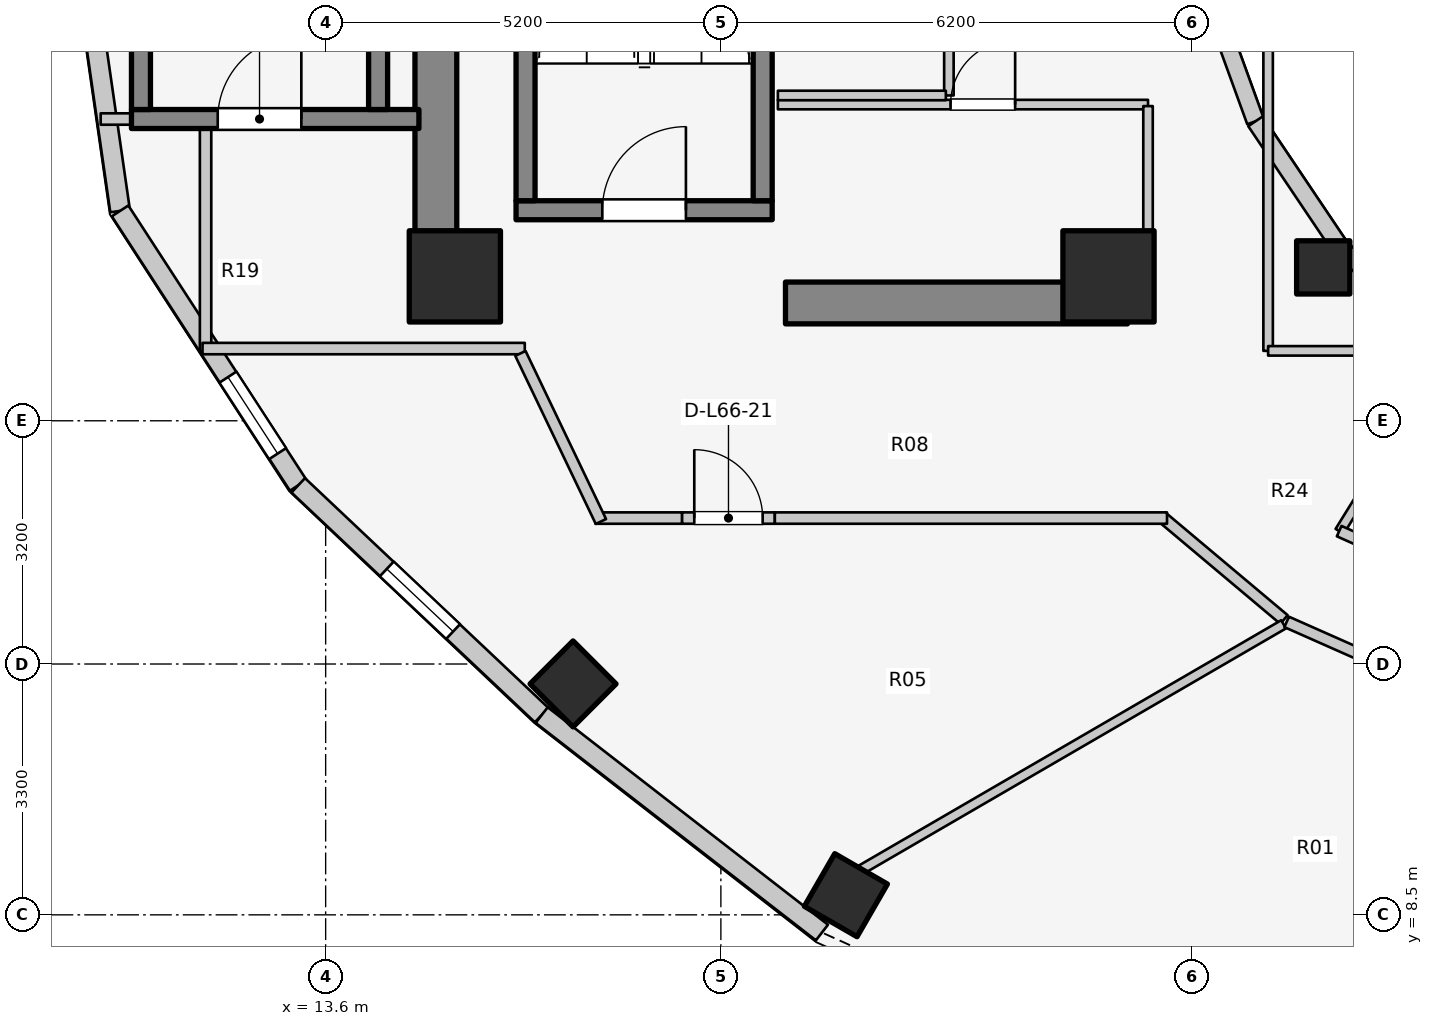
"""IFC4 building model, lengths in metres.
Left out: names, types, materials, properties, quantities, classifications, styles, units other than length and angle.
Written with IfcOpenShell. Run it as: python <this file> out.ifc"""

import sys

from ifc_helpers import new_model, si_unit, direction, frame, frame_2d, origin, origin_2d, place, context, subcontext, project, spatial, rectangle, extrude, element, fill, save


model = new_model("IFC4")
c1 = context("Model", 3, precision=1e-05, world=origin(), true_north=direction((0.0, 1.0)))
c2 = subcontext(c1, "Body", "Model", "MODEL_VIEW")
j1 = project(units=[si_unit("LENGTHUNIT", "METRE"), si_unit("PLANEANGLEUNIT", "RADIAN")], contexts=[c1])
p1 = place(None, origin())
s1 = spatial("IfcSite", under=j1, at=p1, CompositionType="ELEMENT")
p2 = place(p1, origin())
s2 = spatial("IfcBuilding", under=s1, at=p2, CompositionType="ELEMENT")
p3 = place(p2, frame((0.0, 0.0, 217.1)))
s3 = spatial("IfcBuildingStorey", under=s2, at=p3, CompositionType="ELEMENT", Elevation=217.1)
p4 = place(p3, frame((15.05, 17.05, 0.0), z_axis=(0.0, 0.0, 1.0), x_axis=(0.0, 1.0, 0.0)))
e1 = element("IfcWall", 1, at=p4, inside=s3, PredefinedType="SHEAR", context=c2, shape_type="SweptSolid", body=[
    extrude(rectangle(XDim=12.8, YDim=0.55, at=frame_2d((6.4, 0.0))), origin(), (0.0, 0.0, 1.0), 3.1),
])
p5 = place(p3, frame((19.65, 16.55, 0.0), z_axis=(0.0, 0.0, 1.0), x_axis=(1.0, 0.0, 0.0)))
e2 = element("IfcWall", 2, at=p5, inside=s3, PredefinedType="SHEAR", context=c2, shape_type="SweptSolid", body=[
    extrude(rectangle(XDim=4.5, YDim=0.55, at=frame_2d((2.25, 0.0))), origin(), (0.0, 0.0, 1.0), 3.1),
])
p6 = place(p3, frame((16.105, 17.77, 0.0), z_axis=(0.0, 0.0, 1.0), x_axis=(1.0, 0.0, 0.0)))
e3 = element("IfcWall", 3, at=p6, inside=s3, PredefinedType="SOLIDWALL", context=c2, shape_type="SweptSolid", body=[
    extrude(rectangle(XDim=3.37, YDim=0.25, at=frame_2d((1.685, 0.0))), origin(), (0.0, 0.0, 1.0), 3.1),
])
p7 = place(p6, frame((1.135, 0.0, 0.0)))
e4 = element("IfcOpeningElement", 4, at=p7, cuts=e3, PredefinedType="OPENING", context=c2, shape_type="SweptSolid", body=[
    extrude(rectangle(XDim=1.1, YDim=2.1, at=frame_2d((0.55, 1.05))), frame((0.0, 0.135, 0.0), z_axis=(0.0, -1.0, 0.0), x_axis=(1.0, 0.0, 0.0)), (0.0, 0.0, 1.0), 0.27),
])
for number, where, z_axis, x_axis in (
    (5, (16.23, 17.895, 0.0), (0.0, 0.0, 1.0), (0.0, 1.0, 0.0)),
    (6, (19.35, 17.895, 0.0), (0.0, 0.0, 1.0), (0.0, 1.0, 0.0)),
):
    element("IfcWall", number, at=place(p3, frame(where, z_axis=z_axis, x_axis=x_axis)), inside=s3, PredefinedType="SOLIDWALL", context=c2, shape_type="SweptSolid", body=[
        extrude(rectangle(XDim=7.81, YDim=0.25, at=frame_2d((3.905, 0.0))), origin(), (0.0, 0.0, 1.0), 3.1),
    ])
p8 = place(p3, frame((11.045, 18.97, 0.0), z_axis=(0.0, 0.0, 1.0), x_axis=(1.0, 0.0, 0.0)))
e7 = element("IfcWall", 7, at=p8, inside=s3, PredefinedType="SOLIDWALL", context=c2, shape_type="SweptSolid", body=[
    extrude(rectangle(XDim=3.782, YDim=0.25, at=frame_2d((1.891, 0.0))), origin(), (0.0, 0.0, 1.0), 3.1),
])
p9 = place(p8, frame((1.135, 0.0, 0.0)))
e8 = element("IfcOpeningElement", 8, at=p9, cuts=e7, PredefinedType="OPENING", context=c2, shape_type="SweptSolid", body=[
    extrude(rectangle(XDim=1.1, YDim=2.1, at=frame_2d((0.55, 1.05))), frame((0.0, 0.135, 0.0), z_axis=(0.0, -1.0, 0.0), x_axis=(1.0, 0.0, 0.0)), (0.0, 0.0, 1.0), 0.27),
])
for number, where, z_axis, x_axis in (
    (9, (11.17, 19.095, 0.0), (0.0, 0.0, 1.0), (0.0, 1.0, 0.0)),
    (10, (14.29, 19.095, 0.0), (0.0, 0.0, 1.0), (0.0, 1.0, 0.0)),
):
    element("IfcWall", number, at=place(p3, frame(where, z_axis=z_axis, x_axis=x_axis)), inside=s3, PredefinedType="SOLIDWALL", context=c2, shape_type="SweptSolid", body=[
        extrude(rectangle(XDim=7.81, YDim=0.25, at=frame_2d((3.905, 0.0))), origin(), (0.0, 0.0, 1.0), 3.1),
    ])
for number, where, z_axis, x_axis in (
    (11, (15.3, 16.9, 0.0), (0.0, 0.0, 1.0), (1.0, 0.0, 0.0)),
    (12, (23.9, 16.9, 0.0), (0.0, 0.0, 1.0), (1.0, 0.0, 0.0)),
):
    element("IfcColumn", number, at=place(p3, frame(where, z_axis=z_axis, x_axis=x_axis)), inside=s3, PredefinedType="COLUMN", context=c2, shape_type="SweptSolid", body=[
        extrude(rectangle(XDim=1.2, YDim=1.2, at=origin_2d()), origin(), (0.0, 0.0, 1.0), 3.1),
    ])
p10 = place(p3, frame((26.725, 17.018, 0.0), z_axis=(0.0, 0.0, 1.0), x_axis=(1.0, 0.0, 0.0)))
e13 = element("IfcColumn", 13, at=p10, inside=s3, PredefinedType="COLUMN", context=c2, shape_type="SweptSolid", body=[
    extrude(rectangle(XDim=0.7, YDim=0.7, at=origin_2d()), origin(), (0.0, 0.0, 1.0), 3.1),
])
for number, where, z_axis, x_axis in (
    (14, (16.855, 11.538, 0.0), (0.0, 0.0, 1.0), (-0.707, -0.707, 0.0)),
    (15, (20.445, 8.759, 0.0), (0.0, 0.0, 1.0), (-0.5, -0.866, 0.0)),
):
    element("IfcColumn", number, at=place(p3, frame(where, z_axis=z_axis, x_axis=x_axis)), inside=s3, PredefinedType="COLUMN", context=c2, shape_type="SweptSolid", body=[
        extrude(rectangle(XDim=0.8, YDim=0.8, at=origin_2d()), origin(), (0.0, 0.0, 1.0), 3.1),
    ])
p11 = place(p3, frame((25.123, 20.898, 0.0), z_axis=(0.0, 0.0, 1.0), x_axis=(0.341423187295, -0.93990968033, 0.0)))
e16 = element("IfcWall", 16, at=p11, inside=s3, PredefinedType="STANDARD", context=c2, shape_type="SweptSolid", body=[
    extrude(rectangle(XDim=2.084, YDim=0.23, at=frame_2d((1.042, 0.0))), origin(), (0.0, 0.0, 1.0), 2.56),
])
p12 = place(p3, frame((25.834, 18.94, 0.0), z_axis=(0.0, 0.0, 1.0), x_axis=(0.558197800898, -0.829707909492, 0.0)))
e17 = element("IfcWall", 17, at=p12, inside=s3, PredefinedType="STANDARD", context=c2, shape_type="SweptSolid", body=[
    extrude(rectangle(XDim=2.027, YDim=0.23, at=frame_2d((1.013, 0.0))), origin(), (0.0, 0.0, 1.0), 1.22),
])
p13 = place(p3, frame((26.965, 17.258, 0.0), z_axis=(0.0, 0.0, 1.0), x_axis=(0.752576694707, -0.658504607869, 0.0)))
e18 = element("IfcWall", 18, at=p13, inside=s3, PredefinedType="STANDARD", context=c2, shape_type="SweptSolid", body=[
    extrude(rectangle(XDim=1.959, YDim=0.23, at=frame_2d((0.98, 0.0))), origin(), (0.0, 0.0, 1.0), 1.22),
])
p14 = place(p3, frame((10.14, 23.0, 0.0), z_axis=(0.0, 0.0, 1.0), x_axis=(0.142712754019, -0.989764148593, 0.0)))
e19 = element("IfcWall", 19, at=p14, inside=s3, PredefinedType="STANDARD", context=c2, shape_type="SweptSolid", body=[
    extrude(rectangle(XDim=5.293, YDim=0.26, at=frame_2d((2.646, 0.0))), origin(), (0.0, 0.0, 1.0), 2.57),
])
p15 = place(p14, frame((1.458, 0.0, 0.75)))
e20 = element("IfcOpeningElement", 20, at=p15, cuts=e19, PredefinedType="OPENING", context=c2, shape_type="SweptSolid", body=[
    extrude(rectangle(XDim=1.2, YDim=1.5, at=frame_2d((0.6, 0.75))), frame((0.0, 0.14, 0.0), z_axis=(0.0, -1.0, 0.0), x_axis=(1.0, 0.0, 0.0)), (0.0, 0.0, 1.0), 0.28),
])
p16 = place(p3, frame((10.895, 17.761, 0.0), z_axis=(0.0, 0.0, 1.0), x_axis=(0.544475908819, -0.838776480784, 0.0)))
e21 = element("IfcWall", 21, at=p16, inside=s3, PredefinedType="STANDARD", context=c2, shape_type="SweptSolid", body=[
    extrude(rectangle(XDim=4.305, YDim=0.26, at=frame_2d((2.152, 0.0))), origin(), (0.0, 0.0, 1.0), 1.22),
])
p17 = place(p16, frame((2.607, 0.0, 0.15)))
e22 = element("IfcOpeningElement", 22, at=p17, cuts=e21, PredefinedType="OPENING", context=c2, shape_type="SweptSolid", body=[
    extrude(rectangle(XDim=1.2, YDim=0.9, at=frame_2d((0.6, 0.45))), frame((0.0, 0.14, 0.0), z_axis=(0.0, -1.0, 0.0), x_axis=(1.0, 0.0, 0.0)), (0.0, 0.0, 1.0), 0.28),
])
p18 = place(p3, frame((13.239, 14.151, 0.0), z_axis=(0.0, 0.0, 1.0), x_axis=(0.72731899451, -0.686299555752, 0.0)))
e23 = element("IfcWall", 23, at=p18, inside=s3, PredefinedType="STANDARD", context=c2, shape_type="SweptSolid", body=[
    extrude(rectangle(XDim=4.404, YDim=0.26, at=frame_2d((2.202, 0.0))), origin(), (0.0, 0.0, 1.0), 1.22),
])
p19 = place(p18, frame((1.602, 0.0, 0.15)))
e24 = element("IfcOpeningElement", 24, at=p19, cuts=e23, PredefinedType="OPENING", context=c2, shape_type="SweptSolid", body=[
    extrude(rectangle(XDim=1.2, YDim=0.9, at=frame_2d((0.6, 0.45))), frame((0.0, 0.14, 0.0), z_axis=(0.0, -1.0, 0.0), x_axis=(1.0, 0.0, 0.0)), (0.0, 0.0, 1.0), 0.28),
])
p20 = place(p3, frame((16.442, 11.128, 0.0), z_axis=(0.0, 0.0, 1.0), x_axis=(0.790126214723, -0.612944177563, 0.0)))
e25 = element("IfcWall", 25, at=p20, inside=s3, PredefinedType="STANDARD", context=c2, shape_type="SweptSolid", body=[
    extrude(rectangle(XDim=4.667, YDim=0.26, at=frame_2d((2.333, 0.0))), origin(), (0.0, 0.0, 1.0), 1.22),
])
p21 = place(p3, frame((19.55, 19.16, 0.0), z_axis=(0.0, 0.0, 1.0), x_axis=(1.0, 0.0, 0.0)))
e26 = element("IfcWall", 26, at=p21, inside=s3, PredefinedType="PARTITIONING", context=c2, shape_type="SweptSolid", body=[
    extrude(rectangle(XDim=4.87, YDim=0.125, at=frame_2d((2.435, 0.0))), origin(), (0.0, 0.0, 1.0), 2.12),
])
p22 = place(p21, frame((2.272, 0.0, 0.0)))
e27 = element("IfcOpeningElement", 27, at=p22, cuts=e26, PredefinedType="OPENING", context=c2, shape_type="SweptSolid", body=[
    extrude(rectangle(XDim=0.85, YDim=2.05, at=frame_2d((0.425, 1.025))), frame((0.0, 0.073, 0.0), z_axis=(0.0, -1.0, 0.0), x_axis=(1.0, 0.0, 0.0)), (0.0, 0.0, 1.0), 0.145),
])
p23 = place(p3, frame((24.42, 17.1, 0.0), z_axis=(0.0, 0.0, 1.0), x_axis=(0.0, 1.0, 0.0)))
e28 = element("IfcWall", 28, at=p23, inside=s3, PredefinedType="PARTITIONING", context=c2, shape_type="SweptSolid", body=[
    extrude(rectangle(XDim=2.04, YDim=0.125, at=frame_2d((1.02, 0.0))), origin(), (0.0, 0.0, 1.0), 1.952),
])
p24 = place(p3, frame((21.8, 19.28, 0.0), z_axis=(0.0, 0.0, 1.0), x_axis=(0.0, 1.0, 0.0)))
e29 = element("IfcWall", 29, at=p24, inside=s3, PredefinedType="PARTITIONING", context=c2, shape_type="SweptSolid", body=[
    extrude(rectangle(XDim=2.4, YDim=0.125, at=frame_2d((1.2, 0.0))), origin(), (0.0, 0.0, 1.0), 2.575),
])
p25 = place(p24, frame((0.7, 0.0, 0.0)))
e30 = element("IfcOpeningElement", 30, at=p25, cuts=e29, PredefinedType="OPENING", context=c2, shape_type="SweptSolid", body=[
    extrude(rectangle(XDim=0.85, YDim=2.05, at=frame_2d((0.425, 1.025))), frame((0.0, 0.073, 0.0), z_axis=(0.0, -1.0, 0.0), x_axis=(1.0, 0.0, 0.0)), (0.0, 0.0, 1.0), 0.145),
])
p26 = place(p3, frame((19.55, 19.28, 0.0), z_axis=(0.0, 0.0, 1.0), x_axis=(1.0, 0.0, 0.0)))
e31 = element("IfcWall", 31, at=p26, inside=s3, PredefinedType="PARTITIONING", context=c2, shape_type="SweptSolid", body=[
    extrude(rectangle(XDim=2.21, YDim=0.125, at=frame_2d((1.105, 0.0))), origin(), (0.0, 0.0, 1.0), 2.12),
])
p27 = place(p3, frame((28.45, 15.985, 0.0), z_axis=(0.0, 0.0, 1.0), x_axis=(-0.52592395012, -0.850531597702, 0.0)))
e32 = element("IfcWall", 32, at=p27, inside=s3, PredefinedType="PARTITIONING", context=c2, shape_type="SweptSolid", body=[
    extrude(rectangle(XDim=2.869, YDim=0.125, at=frame_2d((1.435, 0.0))), origin(), (0.0, 0.0, 1.0), 1.22),
])
p28 = place(p3, frame((26.935, 13.549, 0.0), z_axis=(0.0, 0.0, 1.0), x_axis=(0.912859324183, -0.408274239027, 0.0)))
e33 = element("IfcWall", 33, at=p28, inside=s3, PredefinedType="PARTITIONING", context=c2, shape_type="SweptSolid", body=[
    extrude(rectangle(XDim=2.682, YDim=0.15, at=frame_2d((1.341, 0.0))), origin(), (0.0, 0.0, 1.0), 1.22),
])
p29 = place(p3, frame((26.0, 15.92, 0.0), z_axis=(0.0, 0.0, 1.0), x_axis=(0.0, 1.0, 0.0)))
e34 = element("IfcWall", 34, at=p29, inside=s3, PredefinedType="PARTITIONING", context=c2, shape_type="SweptSolid", body=[
    extrude(rectangle(XDim=4.28, YDim=0.125, at=frame_2d((2.14, 0.0))), origin(), (0.0, 0.0, 1.0), 1.22),
])
p30 = place(p3, frame((26.0, 15.92, 0.0), z_axis=(0.0, 0.0, 1.0), x_axis=(1.0, 0.0, 0.0)))
e35 = element("IfcWall", 35, at=p30, inside=s3, PredefinedType="PARTITIONING", context=c2, shape_type="SweptSolid", body=[
    extrude(rectangle(XDim=2.6, YDim=0.125, at=frame_2d((1.3, 0.0))), origin(), (0.0, 0.0, 1.0), 1.22),
])
p31 = place(p3, frame((10.64, 18.97, 0.0), z_axis=(0.0, 0.0, 1.0), x_axis=(1.0, 0.0, 0.0)))
e36 = element("IfcWall", 36, at=p31, inside=s3, PredefinedType="PARTITIONING", context=c2, shape_type="SweptSolid", body=[
    extrude(rectangle(XDim=0.4, YDim=0.15, at=frame_2d((0.2, 0.0))), origin(), (0.0, 0.0, 1.0), 2.575),
])
p32 = place(p3, frame((12.02, 15.91, 0.0), z_axis=(0.0, 0.0, 1.0), x_axis=(0.0, 1.0, 0.0)))
e37 = element("IfcWall", 37, at=p32, inside=s3, PredefinedType="PARTITIONING", context=c2, shape_type="SweptSolid", body=[
    extrude(rectangle(XDim=2.93, YDim=0.15, at=frame_2d((1.465, 0.0))), origin(), (0.0, 0.0, 1.0), 2.575),
])
p33 = place(p3, frame((11.98, 15.95, 0.0), z_axis=(0.0, 0.0, 1.0), x_axis=(1.0, 0.0, 0.0)))
e38 = element("IfcWall", 38, at=p33, inside=s3, PredefinedType="PARTITIONING", context=c2, shape_type="SweptSolid", body=[
    extrude(rectangle(XDim=4.24, YDim=0.15, at=frame_2d((2.12, 0.0))), origin(), (0.0, 0.0, 1.0), 1.22),
])
p34 = place(p3, frame((26.209, 12.385, 0.0), z_axis=(0.0, 0.0, 1.0), x_axis=(-0.765677451641, 0.643224719711, 0.0)))
e39 = element("IfcWall", 39, at=p34, inside=s3, PredefinedType="PARTITIONING", context=c2, shape_type="SweptSolid", body=[
    extrude(rectangle(XDim=2.105, YDim=0.15, at=frame_2d((1.053, 0.0))), origin(), (0.0, 0.0, 1.0), 1.22),
])
p35 = place(p3, frame((17.15, 13.72, 0.0), z_axis=(0.0, 0.0, 1.0), x_axis=(1.0, 0.0, 0.0)))
e40 = element("IfcWall", 40, at=p35, inside=s3, PredefinedType="PARTITIONING", context=c2, shape_type="SweptSolid", body=[
    extrude(rectangle(XDim=1.14, YDim=0.15, at=frame_2d((0.57, 0.0))), origin(), (0.0, 0.0, 1.0), 2.575),
])
p36 = place(p3, frame((18.29, 13.72, 0.0), z_axis=(0.0, 0.0, 1.0), x_axis=(1.0, 0.0, 0.0)))
e41 = element("IfcWall", 41, at=p36, inside=s3, PredefinedType="PARTITIONING", context=c2, shape_type="SweptSolid", body=[
    extrude(rectangle(XDim=1.22, YDim=0.15, at=frame_2d((0.61, 0.0))), origin(), (0.0, 0.0, 1.0), 2.575),
])
p37 = place(p36, frame((0.16, 0.0, 0.0)))
e42 = element("IfcOpeningElement", 42, at=p37, cuts=e41, PredefinedType="OPENING", context=c2, shape_type="SweptSolid", body=[
    extrude(rectangle(XDim=0.9, YDim=2.1, at=frame_2d((0.45, 1.05))), frame((0.0, 0.085, 0.0), z_axis=(0.0, -1.0, 0.0), x_axis=(1.0, 0.0, 0.0)), (0.0, 0.0, 1.0), 0.17),
])
p38 = place(p3, frame((19.51, 13.72, 0.0), z_axis=(0.0, 0.0, 1.0), x_axis=(1.0, 0.0, 0.0)))
e43 = element("IfcWall", 43, at=p38, inside=s3, PredefinedType="PARTITIONING", context=c2, shape_type="SweptSolid", body=[
    extrude(rectangle(XDim=5.16, YDim=0.15, at=frame_2d((2.58, 0.0))), origin(), (0.0, 0.0, 1.0), 1.22),
])
p39 = place(p3, frame((17.222, 13.675, 0.0), z_axis=(0.0, 0.0, 1.0), x_axis=(-0.431973389813, 0.901886351207, 0.0)))
e44 = element("IfcWall", 44, at=p39, inside=s3, PredefinedType="PARTITIONING", context=c2, shape_type="SweptSolid", body=[
    extrude(rectangle(XDim=2.452, YDim=0.15, at=frame_2d((1.226, 0.0))), origin(), (0.0, 0.0, 1.0), 2.575),
])
p40 = place(p3, frame((26.203, 12.322, 0.0), z_axis=(0.0, 0.0, 1.0), x_axis=(-0.864712462127, -0.502267217567, 0.0)))
e45 = element("IfcWall", 45, at=p40, inside=s3, PredefinedType="PARTITIONING", context=c2, shape_type="SweptSolid", body=[
    extrude(rectangle(XDim=6.439, YDim=0.125, at=frame_2d((3.22, 0.0))), origin(), (0.0, 0.0, 1.0), 1.22),
])
p41 = place(p3, frame((26.244, 12.354, 0.0), z_axis=(0.0, 0.0, 1.0), x_axis=(0.914302802833, -0.405031337963, 0.0)))
e46 = element("IfcWall", 46, at=p41, inside=s3, PredefinedType="PARTITIONING", context=c2, shape_type="SweptSolid", body=[
    extrude(rectangle(XDim=3.049, YDim=0.15, at=frame_2d((1.525, 0.0))), origin(), (0.0, 0.0, 1.0), 1.22),
])
p42 = place(p17, origin())
e47 = element("IfcWindow", 47, at=p42, inside=s3, PartitioningType="SINGLE_PANEL", PredefinedType="WINDOW", context=c2, shape_type="SweptSolid", body=[
    extrude(rectangle(XDim=1.2, YDim=0.9, at=frame_2d((0.6, 0.45))), frame((0.0, 0.03, 0.0), z_axis=(0.0, -1.0, 0.0), x_axis=(1.0, 0.0, 0.0)), (0.0, 0.0, 1.0), 0.06),
])
fill(e22, e47)
p43 = place(p19, origin())
e48 = element("IfcWindow", 48, at=p43, inside=s3, PartitioningType="SINGLE_PANEL", PredefinedType="WINDOW", context=c2, shape_type="SweptSolid", body=[
    extrude(rectangle(XDim=1.2, YDim=0.9, at=frame_2d((0.6, 0.45))), frame((0.0, 0.03, 0.0), z_axis=(0.0, -1.0, 0.0), x_axis=(1.0, 0.0, 0.0)), (0.0, 0.0, 1.0), 0.06),
])
fill(e24, e48)
p44 = place(p7, origin())
e49 = element("IfcDoor", 49, at=p44, inside=s3, OperationType="SINGLE_SWING_RIGHT", PredefinedType="DOOR", context=c2, shape_type="SweptSolid", body=[
    extrude(rectangle(XDim=1.1, YDim=2.1, at=frame_2d((0.55, 1.05))), frame((0.0, 0.025, 0.0), z_axis=(0.0, -1.0, 0.0), x_axis=(1.0, 0.0, 0.0)), (0.0, 0.0, 1.0), 0.05),
])
fill(e4, e49)
p45 = place(p9, origin())
e50 = element("IfcDoor", 50, at=p45, inside=s3, OperationType="SINGLE_SWING_RIGHT", PredefinedType="DOOR", context=c2, shape_type="SweptSolid", body=[
    extrude(rectangle(XDim=1.1, YDim=2.1, at=frame_2d((0.55, 1.05))), frame((0.0, 0.025, 0.0), z_axis=(0.0, -1.0, 0.0), x_axis=(1.0, 0.0, 0.0)), (0.0, 0.0, 1.0), 0.05),
])
fill(e8, e50)
p46 = place(p22, origin())
e51 = element("IfcDoor", 51, at=p46, inside=s3, OperationType="SINGLE_SWING_RIGHT", PredefinedType="DOOR", context=c2, shape_type="SweptSolid", body=[
    extrude(rectangle(XDim=0.85, YDim=2.05, at=frame_2d((0.425, 1.025))), frame((0.0, 0.025, 0.0), z_axis=(0.0, -1.0, 0.0), x_axis=(1.0, 0.0, 0.0)), (0.0, 0.0, 1.0), 0.05),
])
fill(e27, e51)
p47 = place(p37, origin())
e52 = element("IfcDoor", 52, at=p47, inside=s3, OperationType="SINGLE_SWING_LEFT", PredefinedType="DOOR", context=c2, shape_type="SweptSolid", body=[
    extrude(rectangle(XDim=0.9, YDim=2.1, at=frame_2d((0.45, 1.05))), frame((0.0, 0.025, 0.0), z_axis=(0.0, -1.0, 0.0), x_axis=(1.0, 0.0, 0.0)), (0.0, 0.0, 1.0), 0.05),
])
fill(e42, e52)
save(model, sys.argv[1])
